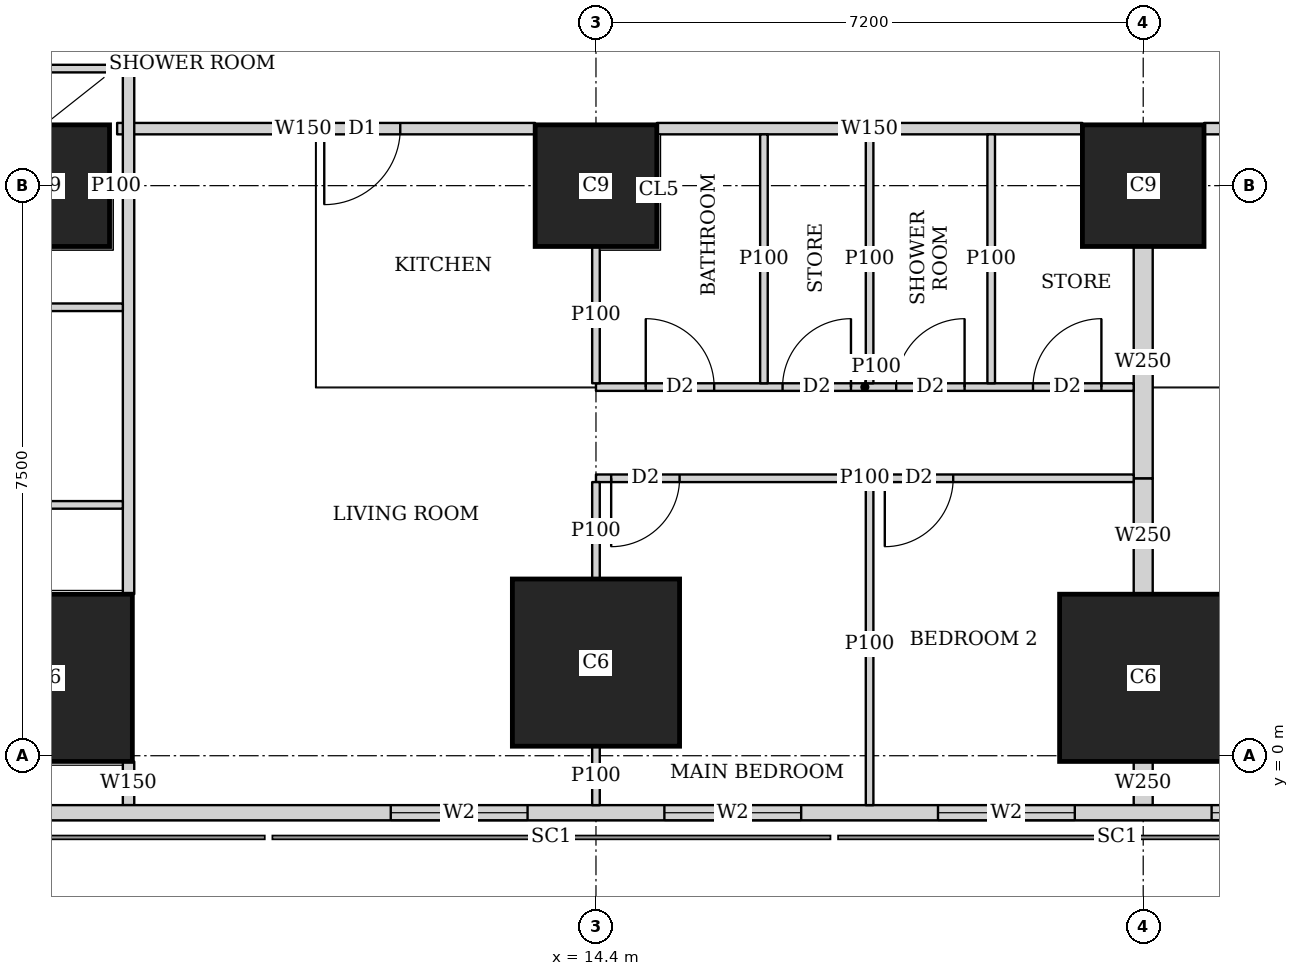
"""IFC4 building model, lengths in metres.
Left out: names, types, materials, properties, quantities, classifications, styles, units other than length and angle.
Written with IfcOpenShell. Run it as: python <this file> out.ifc"""

import sys

from ifc_helpers import new_model, si_unit, direction, frame, frame_2d, origin, origin_2d, place, context, subcontext, project, spatial, rectangle, extrude, element, fill, save


model = new_model("IFC4")
c1 = context("Model", 3, precision=1e-05, world=origin(), true_north=direction((0.0, 1.0)))
c2 = subcontext(c1, "Body", "Model", "MODEL_VIEW")
j1 = project(units=[si_unit("LENGTHUNIT", "METRE"), si_unit("PLANEANGLEUNIT", "RADIAN")], contexts=[c1])
p1 = place(None, origin())
s1 = spatial("IfcSite", under=j1, at=p1, CompositionType="ELEMENT")
p2 = place(p1, origin())
s2 = spatial("IfcBuilding", under=s1, at=p2, CompositionType="ELEMENT")
p3 = place(p2, frame((0.0, 0.0, 100.4)))
s3 = spatial("IfcBuildingStorey", under=s2, at=p3, CompositionType="ELEMENT", Elevation=100.4)
for number, where, z_axis, x_axis in (
    (1, (7.2, 1.025, 0.0), (0.0, 0.0, 1.0), (1.0, 0.0, 0.0)),
    (2, (14.4, 1.225, 0.0), (0.0, 0.0, 1.0), (1.0, 0.0, 0.0)),
    (3, (21.6, 1.025, 0.0), (0.0, 0.0, 1.0), (1.0, 0.0, 0.0)),
):
    element("IfcColumn", number, at=place(p3, frame(where, z_axis=z_axis, x_axis=x_axis)), inside=s3, PredefinedType="COLUMN", context=c2, shape_type="SweptSolid", body=[
        extrude(rectangle(XDim=2.2, YDim=2.2, at=origin_2d()), origin(), (0.0, 0.0, 1.0), 3.75),
    ])
for number, where, z_axis, x_axis in (
    (4, (7.2, 7.5, 0.0), (0.0, 0.0, 1.0), (1.0, 0.0, 0.0)),
    (5, (14.4, 7.5, 0.0), (0.0, 0.0, 1.0), (1.0, 0.0, 0.0)),
    (6, (21.6, 7.5, 0.0), (0.0, 0.0, 1.0), (1.0, 0.0, 0.0)),
):
    element("IfcColumn", number, at=place(p3, frame(where, z_axis=z_axis, x_axis=x_axis)), inside=s3, PredefinedType="COLUMN", context=c2, shape_type="SweptSolid", body=[
        extrude(rectangle(XDim=1.6, YDim=1.6, at=origin_2d()), origin(), (0.0, 0.0, 1.0), 3.75),
    ])
p4 = place(p3, frame((2.163, -0.75, 0.0), z_axis=(0.0, 0.0, 1.0), x_axis=(1.0, 0.0, 0.0)))
e7 = element("IfcWall", 7, at=p4, inside=s3, PredefinedType="SOLIDWALL", context=c2, shape_type="SweptSolid", body=[
    extrude(rectangle(XDim=45.628, YDim=0.2, at=frame_2d((22.814, 0.0))), origin(), (0.0, 0.0, 1.0), 3.5),
])
p5 = place(p4, frame((9.537, 0.0, 0.9)))
e8 = element("IfcOpeningElement", 8, at=p5, cuts=e7, PredefinedType="OPENING", context=c2, shape_type="SweptSolid", body=[
    extrude(rectangle(XDim=1.8, YDim=1.5, at=frame_2d((0.9, 0.75))), frame((0.0, 0.11, 0.0), z_axis=(0.0, -1.0, 0.0), x_axis=(1.0, 0.0, 0.0)), (0.0, 0.0, 1.0), 0.22),
])
p6 = place(p4, frame((13.137, 0.0, 0.9)))
e9 = element("IfcOpeningElement", 9, at=p6, cuts=e7, PredefinedType="OPENING", context=c2, shape_type="SweptSolid", body=[
    extrude(rectangle(XDim=1.8, YDim=1.5, at=frame_2d((0.9, 0.75))), frame((0.0, 0.11, 0.0), z_axis=(0.0, -1.0, 0.0), x_axis=(1.0, 0.0, 0.0)), (0.0, 0.0, 1.0), 0.22),
])
p7 = place(p4, frame((16.737, 0.0, 0.9)))
e10 = element("IfcOpeningElement", 10, at=p7, cuts=e7, PredefinedType="OPENING", context=c2, shape_type="SweptSolid", body=[
    extrude(rectangle(XDim=1.8, YDim=1.5, at=frame_2d((0.9, 0.75))), frame((0.0, 0.11, 0.0), z_axis=(0.0, -1.0, 0.0), x_axis=(1.0, 0.0, 0.0)), (0.0, 0.0, 1.0), 0.22),
])
p8 = place(p4, frame((20.337, 0.0, 0.9)))
e11 = element("IfcOpeningElement", 11, at=p8, cuts=e7, PredefinedType="OPENING", context=c2, shape_type="SweptSolid", body=[
    extrude(rectangle(XDim=1.8, YDim=1.5, at=frame_2d((0.9, 0.75))), frame((0.0, 0.11, 0.0), z_axis=(0.0, -1.0, 0.0), x_axis=(1.0, 0.0, 0.0)), (0.0, 0.0, 1.0), 0.22),
])
p9 = place(p4, frame((23.937, 0.0, 0.9)))
e12 = element("IfcOpeningElement", 12, at=p9, cuts=e7, PredefinedType="OPENING", context=c2, shape_type="SweptSolid", body=[
    extrude(rectangle(XDim=1.8, YDim=1.5, at=frame_2d((0.9, 0.75))), frame((0.0, 0.11, 0.0), z_axis=(0.0, -1.0, 0.0), x_axis=(1.0, 0.0, 0.0)), (0.0, 0.0, 1.0), 0.22),
])
p10 = place(p4, frame((27.537, 0.0, 0.9)))
e13 = element("IfcOpeningElement", 13, at=p10, cuts=e7, PredefinedType="OPENING", context=c2, shape_type="SweptSolid", body=[
    extrude(rectangle(XDim=1.8, YDim=1.5, at=frame_2d((0.9, 0.75))), frame((0.0, 0.11, 0.0), z_axis=(0.0, -1.0, 0.0), x_axis=(1.0, 0.0, 0.0)), (0.0, 0.0, 1.0), 0.22),
])
p11 = place(p4, frame((31.137, 0.0, 0.9)))
e14 = element("IfcOpeningElement", 14, at=p11, cuts=e7, PredefinedType="OPENING", context=c2, shape_type="SweptSolid", body=[
    extrude(rectangle(XDim=1.8, YDim=1.5, at=frame_2d((0.9, 0.75))), frame((0.0, 0.11, 0.0), z_axis=(0.0, -1.0, 0.0), x_axis=(1.0, 0.0, 0.0)), (0.0, 0.0, 1.0), 0.22),
])
p12 = place(p4, frame((34.737, 0.0, 0.9)))
e15 = element("IfcOpeningElement", 15, at=p12, cuts=e7, PredefinedType="OPENING", context=c2, shape_type="SweptSolid", body=[
    extrude(rectangle(XDim=1.8, YDim=1.5, at=frame_2d((0.9, 0.75))), frame((0.0, 0.11, 0.0), z_axis=(0.0, -1.0, 0.0), x_axis=(1.0, 0.0, 0.0)), (0.0, 0.0, 1.0), 0.22),
])
p13 = place(p3, frame((8.25, -0.65, 0.0), z_axis=(0.0, 0.0, 1.0), x_axis=(0.0, 1.0, 0.0)))
e16 = element("IfcWall", 16, at=p13, inside=s3, PredefinedType="SOLIDWALL", context=c2, shape_type="SweptSolid", body=[
    extrude(rectangle(XDim=0.574, YDim=0.15, at=frame_2d((0.287, 0.0))), origin(), (0.0, 0.0, 1.0), 3.5),
])
p14 = place(p3, frame((8.25, 2.126, 0.0), z_axis=(0.0, 0.0, 1.0), x_axis=(0.0, 1.0, 0.0)))
e17 = element("IfcWall", 17, at=p14, inside=s3, PredefinedType="SOLIDWALL", context=c2, shape_type="SweptSolid", body=[
    extrude(rectangle(XDim=40.773, YDim=0.15, at=frame_2d((20.386, 0.0))), origin(), (0.0, 0.0, 1.0), 3.5),
])
p15 = place(p14, frame((10.286, 0.0, 0.0)))
e18 = element("IfcOpeningElement", 18, at=p15, cuts=e17, PredefinedType="OPENING", context=c2, shape_type="SweptSolid", body=[
    extrude(rectangle(XDim=1.0, YDim=2.1, at=frame_2d((0.5, 1.05))), frame((0.0, 0.085, 0.0), z_axis=(0.0, -1.0, 0.0), x_axis=(1.0, 0.0, 0.0)), (0.0, 0.0, 1.0), 0.17),
])
p16 = place(p14, frame((14.461, 0.0, 0.0)))
e19 = element("IfcOpeningElement", 19, at=p16, cuts=e17, PredefinedType="OPENING", context=c2, shape_type="SweptSolid", body=[
    extrude(rectangle(XDim=1.0, YDim=2.1, at=frame_2d((0.5, 1.05))), frame((0.0, 0.085, 0.0), z_axis=(0.0, -1.0, 0.0), x_axis=(1.0, 0.0, 0.0)), (0.0, 0.0, 1.0), 0.17),
])
p17 = place(p14, frame((25.287, 0.0, 0.0)))
e20 = element("IfcOpeningElement", 20, at=p17, cuts=e17, PredefinedType="OPENING", context=c2, shape_type="SweptSolid", body=[
    extrude(rectangle(XDim=1.0, YDim=2.1, at=frame_2d((0.5, 1.05))), frame((0.0, 0.085, 0.0), z_axis=(0.0, -1.0, 0.0), x_axis=(1.0, 0.0, 0.0)), (0.0, 0.0, 1.0), 0.17),
])
p18 = place(p14, frame((32.787, 0.0, 0.0)))
e21 = element("IfcOpeningElement", 21, at=p18, cuts=e17, PredefinedType="OPENING", context=c2, shape_type="SweptSolid", body=[
    extrude(rectangle(XDim=1.0, YDim=2.1, at=frame_2d((0.5, 1.05))), frame((0.0, 0.085, 0.0), z_axis=(0.0, -1.0, 0.0), x_axis=(1.0, 0.0, 0.0)), (0.0, 0.0, 1.0), 0.17),
])
p19 = place(p3, frame((27.999, 8.25, 0.0), z_axis=(0.0, 0.0, 1.0), x_axis=(-1.0, 0.0, 0.0)))
e22 = element("IfcWall", 22, at=p19, inside=s3, PredefinedType="SOLIDWALL", context=c2, shape_type="SweptSolid", body=[
    extrude(rectangle(XDim=5.598, YDim=0.15, at=frame_2d((2.799, 0.0))), origin(), (0.0, 0.0, 1.0), 3.5),
])
p20 = place(p19, frame((3.899, 0.0, 0.0)))
e23 = element("IfcOpeningElement", 23, at=p20, cuts=e22, PredefinedType="OPENING", context=c2, shape_type="SweptSolid", body=[
    extrude(rectangle(XDim=1.0, YDim=2.1, at=frame_2d((0.5, 1.05))), frame((0.0, 0.085, 0.0), z_axis=(0.0, -1.0, 0.0), x_axis=(1.0, 0.0, 0.0)), (0.0, 0.0, 1.0), 0.17),
])
p21 = place(p3, frame((20.799, 8.25, 0.0), z_axis=(0.0, 0.0, 1.0), x_axis=(-1.0, 0.0, 0.0)))
e24 = element("IfcWall", 24, at=p21, inside=s3, PredefinedType="SOLIDWALL", context=c2, shape_type="SweptSolid", body=[
    extrude(rectangle(XDim=5.598, YDim=0.15, at=frame_2d((2.799, 0.0))), origin(), (0.0, 0.0, 1.0), 3.5),
])
p22 = place(p3, frame((13.599, 8.25, 0.0), z_axis=(0.0, 0.0, 1.0), x_axis=(-1.0, 0.0, 0.0)))
e25 = element("IfcWall", 25, at=p22, inside=s3, PredefinedType="SOLIDWALL", context=c2, shape_type="SweptSolid", body=[
    extrude(rectangle(XDim=5.499, YDim=0.15, at=frame_2d((2.75, 0.0))), origin(), (0.0, 0.0, 1.0), 3.5),
])
p23 = place(p22, frame((1.774, 0.0, 0.0)))
e26 = element("IfcOpeningElement", 26, at=p23, cuts=e25, PredefinedType="OPENING", context=c2, shape_type="SweptSolid", body=[
    extrude(rectangle(XDim=1.0, YDim=2.1, at=frame_2d((0.5, 1.05))), frame((0.0, 0.085, 0.0), z_axis=(0.0, -1.0, 0.0), x_axis=(1.0, 0.0, 0.0)), (0.0, 0.0, 1.0), 0.17),
])
p24 = place(p3, frame((8.001, 7.5, 0.0), z_axis=(0.0, 0.0, 1.0), x_axis=(1.0, 0.0, 0.0)))
e27 = element("IfcWall", 27, at=p24, inside=s3, PredefinedType="PARTITIONING", context=c2, shape_type="SweptSolid", body=[
    extrude(rectangle(XDim=0.174, YDim=0.1, at=frame_2d((0.087, 0.0))), origin(), (0.0, 0.0, 1.0), 3.5),
])
for number, where, z_axis, x_axis in (
    (28, (4.9, 9.04, 0.0), (0.0, 0.0, 1.0), (1.0, 0.0, 0.0)),
    (29, (4.9, 5.9, 0.0), (0.0, 0.0, 1.0), (1.0, 0.0, 0.0)),
):
    element("IfcWall", number, at=place(p3, frame(where, z_axis=z_axis, x_axis=x_axis)), inside=s3, PredefinedType="PARTITIONING", context=c2, shape_type="SweptSolid", body=[
        extrude(rectangle(XDim=3.275, YDim=0.1, at=frame_2d((1.638, 0.0))), origin(), (0.0, 0.0, 1.0), 3.5),
    ])
p25 = place(p3, frame((21.475, 3.65, 0.0), z_axis=(0.0, 0.0, 1.0), x_axis=(-1.0, 0.0, 0.0)))
e30 = element("IfcWall", 30, at=p25, inside=s3, PredefinedType="PARTITIONING", context=c2, shape_type="SweptSolid", body=[
    extrude(rectangle(XDim=7.075, YDim=0.1, at=frame_2d((3.538, 0.0))), origin(), (0.0, 0.0, 1.0), 3.5),
])
p26 = place(p25, frame((5.975, 0.0, 0.0)))
e31 = element("IfcOpeningElement", 31, at=p26, cuts=e30, PredefinedType="OPENING", context=c2, shape_type="SweptSolid", body=[
    extrude(rectangle(XDim=0.9, YDim=2.1, at=frame_2d((0.45, 1.05))), frame((0.0, 0.06, 0.0), z_axis=(0.0, -1.0, 0.0), x_axis=(1.0, 0.0, 0.0)), (0.0, 0.0, 1.0), 0.12),
])
p27 = place(p25, frame((2.375, 0.0, 0.0)))
e32 = element("IfcOpeningElement", 32, at=p27, cuts=e30, PredefinedType="OPENING", context=c2, shape_type="SweptSolid", body=[
    extrude(rectangle(XDim=0.9, YDim=2.1, at=frame_2d((0.45, 1.05))), frame((0.0, 0.06, 0.0), z_axis=(0.0, -1.0, 0.0), x_axis=(1.0, 0.0, 0.0)), (0.0, 0.0, 1.0), 0.12),
])
p28 = place(p3, frame((21.475, 4.85, 0.0), z_axis=(0.0, 0.0, 1.0), x_axis=(-1.0, 0.0, 0.0)))
e33 = element("IfcWall", 33, at=p28, inside=s3, PredefinedType="PARTITIONING", context=c2, shape_type="SweptSolid", body=[
    extrude(rectangle(XDim=7.075, YDim=0.1, at=frame_2d((3.538, 0.0))), origin(), (0.0, 0.0, 1.0), 3.5),
])
p29 = place(p28, frame((5.52, 0.0, 0.0)))
e34 = element("IfcOpeningElement", 34, at=p29, cuts=e33, PredefinedType="OPENING", context=c2, shape_type="SweptSolid", body=[
    extrude(rectangle(XDim=0.9, YDim=2.1, at=frame_2d((0.45, 1.05))), frame((0.0, 0.06, 0.0), z_axis=(0.0, -1.0, 0.0), x_axis=(1.0, 0.0, 0.0)), (0.0, 0.0, 1.0), 0.12),
])
p30 = place(p28, frame((2.225, 0.0, 0.0)))
e35 = element("IfcOpeningElement", 35, at=p30, cuts=e33, PredefinedType="OPENING", context=c2, shape_type="SweptSolid", body=[
    extrude(rectangle(XDim=0.9, YDim=2.1, at=frame_2d((0.45, 1.05))), frame((0.0, 0.06, 0.0), z_axis=(0.0, -1.0, 0.0), x_axis=(1.0, 0.0, 0.0)), (0.0, 0.0, 1.0), 0.12),
])
p31 = place(p28, frame((3.72, 0.0, 0.0)))
e36 = element("IfcOpeningElement", 36, at=p31, cuts=e33, PredefinedType="OPENING", context=c2, shape_type="SweptSolid", body=[
    extrude(rectangle(XDim=0.9, YDim=2.1, at=frame_2d((0.45, 1.05))), frame((0.0, 0.06, 0.0), z_axis=(0.0, -1.0, 0.0), x_axis=(1.0, 0.0, 0.0)), (0.0, 0.0, 1.0), 0.12),
])
p32 = place(p28, frame((0.425, 0.0, 0.0)))
e37 = element("IfcOpeningElement", 37, at=p32, cuts=e33, PredefinedType="OPENING", context=c2, shape_type="SweptSolid", body=[
    extrude(rectangle(XDim=0.9, YDim=2.1, at=frame_2d((0.45, 1.05))), frame((0.0, 0.06, 0.0), z_axis=(0.0, -1.0, 0.0), x_axis=(1.0, 0.0, 0.0)), (0.0, 0.0, 1.0), 0.12),
])
p33 = place(p3, frame((14.4, -0.65, 0.0), z_axis=(0.0, 0.0, 1.0), x_axis=(0.0, 1.0, 0.0)))
e38 = element("IfcWall", 38, at=p33, inside=s3, PredefinedType="PARTITIONING", context=c2, shape_type="SweptSolid", body=[
    extrude(rectangle(XDim=0.774, YDim=0.1, at=frame_2d((0.387, 0.0))), origin(), (0.0, 0.0, 1.0), 3.5),
])
p34 = place(p3, frame((14.4, 2.326, 0.0), z_axis=(0.0, 0.0, 1.0), x_axis=(0.0, 1.0, 0.0)))
e39 = element("IfcWall", 39, at=p34, inside=s3, PredefinedType="PARTITIONING", context=c2, shape_type="SweptSolid", body=[
    extrude(rectangle(XDim=1.274, YDim=0.1, at=frame_2d((0.637, 0.0))), origin(), (0.0, 0.0, 1.0), 3.5),
])
p35 = place(p3, frame((18.0, -0.65, 0.0), z_axis=(0.0, 0.0, 1.0), x_axis=(0.0, 1.0, 0.0)))
e40 = element("IfcWall", 40, at=p35, inside=s3, PredefinedType="PARTITIONING", context=c2, shape_type="SweptSolid", body=[
    extrude(rectangle(XDim=4.25, YDim=0.1, at=frame_2d((2.125, 0.0))), origin(), (0.0, 0.0, 1.0), 2.2),
])
p36 = place(p3, frame((14.4, 4.9, 0.0), z_axis=(0.0, 0.0, 1.0), x_axis=(0.0, 1.0, 0.0)))
e41 = element("IfcWall", 41, at=p36, inside=s3, PredefinedType="PARTITIONING", context=c2, shape_type="SweptSolid", body=[
    extrude(rectangle(XDim=1.799, YDim=0.1, at=frame_2d((0.899, 0.0))), origin(), (0.0, 0.0, 1.0), 3.5),
])
for number, where, z_axis, x_axis in (
    (42, (18.0, 4.9, 0.0), (0.0, 0.0, 1.0), (0.0, 1.0, 0.0)),
    (43, (16.61, 4.9, 0.0), (0.0, 0.0, 1.0), (0.0, 1.0, 0.0)),
    (44, (19.6, 4.9, 0.0), (0.0, 0.0, 1.0), (0.0, 1.0, 0.0)),
):
    element("IfcWall", number, at=place(p3, frame(where, z_axis=z_axis, x_axis=x_axis)), inside=s3, PredefinedType="PARTITIONING", context=c2, shape_type="SweptSolid", body=[
        extrude(rectangle(XDim=3.275, YDim=0.1, at=frame_2d((1.638, 0.0))), origin(), (0.0, 0.0, 1.0), 3.5),
    ])
p37 = place(p3, frame((21.6, -0.65, 0.0), z_axis=(0.0, 0.0, 1.0), x_axis=(0.0, 1.0, 0.0)))
e45 = element("IfcWall", 45, at=p37, inside=s3, PredefinedType="SOLIDWALL", context=c2, shape_type="SweptSolid", body=[
    extrude(rectangle(XDim=0.574, YDim=0.25, at=frame_2d((0.287, 0.0))), origin(), (0.0, 0.0, 1.0), 3.5),
])
p38 = place(p3, frame((21.6, 2.126, 0.0), z_axis=(0.0, 0.0, 1.0), x_axis=(0.0, 1.0, 0.0)))
e46 = element("IfcWall", 46, at=p38, inside=s3, PredefinedType="SOLIDWALL", context=c2, shape_type="SweptSolid", body=[
    extrude(rectangle(XDim=1.524, YDim=0.25, at=frame_2d((0.762, 0.0))), origin(), (0.0, 0.0, 1.0), 3.5),
])
p39 = place(p3, frame((21.6, 3.65, 0.0), z_axis=(0.0, 0.0, 1.0), x_axis=(0.0, 1.0, 0.0)))
e47 = element("IfcWall", 47, at=p39, inside=s3, PredefinedType="SOLIDWALL", context=c2, shape_type="SweptSolid", body=[
    extrude(rectangle(XDim=3.049, YDim=0.25, at=frame_2d((1.524, 0.0))), origin(), (0.0, 0.0, 1.0), 3.5),
])
p40 = place(p3, frame((8.175, 3.3, 0.0), z_axis=(0.0, 0.0, 1.0), x_axis=(-1.0, 0.0, 0.0)))
e48 = element("IfcWall", 48, at=p40, inside=s3, PredefinedType="PARTITIONING", context=c2, shape_type="SweptSolid", body=[
    extrude(rectangle(XDim=3.275, YDim=0.1, at=frame_2d((1.638, 0.0))), origin(), (0.0, 0.0, 1.0), 3.5),
])
p41 = place(p40, frame((2.1, 0.0, 0.0)))
e49 = element("IfcOpeningElement", 49, at=p41, cuts=e48, PredefinedType="OPENING", context=c2, shape_type="SweptSolid", body=[
    extrude(rectangle(XDim=0.9, YDim=2.1, at=frame_2d((0.45, 1.05))), frame((0.0, 0.06, 0.0), z_axis=(0.0, -1.0, 0.0), x_axis=(1.0, 0.0, 0.0)), (0.0, 0.0, 1.0), 0.12),
])
p42 = place(p5, origin())
e50 = element("IfcWindow", 50, at=p42, inside=s3, PartitioningType="SINGLE_PANEL", PredefinedType="WINDOW", context=c2, shape_type="SweptSolid", body=[
    extrude(rectangle(XDim=1.8, YDim=1.5, at=frame_2d((0.9, 0.75))), frame((0.0, 0.03, 0.0), z_axis=(0.0, -1.0, 0.0), x_axis=(1.0, 0.0, 0.0)), (0.0, 0.0, 1.0), 0.06),
])
fill(e8, e50)
p43 = place(p6, origin())
e51 = element("IfcWindow", 51, at=p43, inside=s3, PartitioningType="SINGLE_PANEL", PredefinedType="WINDOW", context=c2, shape_type="SweptSolid", body=[
    extrude(rectangle(XDim=1.8, YDim=1.5, at=frame_2d((0.9, 0.75))), frame((0.0, 0.03, 0.0), z_axis=(0.0, -1.0, 0.0), x_axis=(1.0, 0.0, 0.0)), (0.0, 0.0, 1.0), 0.06),
])
fill(e9, e51)
p44 = place(p7, origin())
e52 = element("IfcWindow", 52, at=p44, inside=s3, PartitioningType="SINGLE_PANEL", PredefinedType="WINDOW", context=c2, shape_type="SweptSolid", body=[
    extrude(rectangle(XDim=1.8, YDim=1.5, at=frame_2d((0.9, 0.75))), frame((0.0, 0.03, 0.0), z_axis=(0.0, -1.0, 0.0), x_axis=(1.0, 0.0, 0.0)), (0.0, 0.0, 1.0), 0.06),
])
fill(e10, e52)
p45 = place(p8, origin())
e53 = element("IfcWindow", 53, at=p45, inside=s3, PartitioningType="SINGLE_PANEL", PredefinedType="WINDOW", context=c2, shape_type="SweptSolid", body=[
    extrude(rectangle(XDim=1.8, YDim=1.5, at=frame_2d((0.9, 0.75))), frame((0.0, 0.03, 0.0), z_axis=(0.0, -1.0, 0.0), x_axis=(1.0, 0.0, 0.0)), (0.0, 0.0, 1.0), 0.06),
])
fill(e11, e53)
p46 = place(p26, origin())
e54 = element("IfcDoor", 54, at=p46, inside=s3, OperationType="SINGLE_SWING_RIGHT", PredefinedType="DOOR", context=c2, shape_type="SweptSolid", body=[
    extrude(rectangle(XDim=0.9, YDim=2.1, at=frame_2d((0.45, 1.05))), frame((0.0, 0.025, 0.0), z_axis=(0.0, -1.0, 0.0), x_axis=(1.0, 0.0, 0.0)), (0.0, 0.0, 1.0), 0.05),
])
fill(e31, e54)
p47 = place(p27, origin())
e55 = element("IfcDoor", 55, at=p47, inside=s3, OperationType="SINGLE_SWING_RIGHT", PredefinedType="DOOR", context=c2, shape_type="SweptSolid", body=[
    extrude(rectangle(XDim=0.9, YDim=2.1, at=frame_2d((0.45, 1.05))), frame((0.0, 0.025, 0.0), z_axis=(0.0, -1.0, 0.0), x_axis=(1.0, 0.0, 0.0)), (0.0, 0.0, 1.0), 0.05),
])
fill(e32, e55)
p48 = place(p29, origin())
e56 = element("IfcDoor", 56, at=p48, inside=s3, OperationType="SINGLE_SWING_LEFT", PredefinedType="DOOR", context=c2, shape_type="SweptSolid", body=[
    extrude(rectangle(XDim=0.9, YDim=2.1, at=frame_2d((0.45, 1.05))), frame((0.0, 0.025, 0.0), z_axis=(0.0, -1.0, 0.0), x_axis=(1.0, 0.0, 0.0)), (0.0, 0.0, 1.0), 0.05),
])
fill(e34, e56)
p49 = place(p30, origin())
e57 = element("IfcDoor", 57, at=p49, inside=s3, OperationType="SINGLE_SWING_RIGHT", PredefinedType="DOOR", context=c2, shape_type="SweptSolid", body=[
    extrude(rectangle(XDim=0.9, YDim=2.1, at=frame_2d((0.45, 1.05))), frame((0.0, 0.025, 0.0), z_axis=(0.0, -1.0, 0.0), x_axis=(1.0, 0.0, 0.0)), (0.0, 0.0, 1.0), 0.05),
])
fill(e35, e57)
p50 = place(p31, origin())
e58 = element("IfcDoor", 58, at=p50, inside=s3, OperationType="SINGLE_SWING_RIGHT", PredefinedType="DOOR", context=c2, shape_type="SweptSolid", body=[
    extrude(rectangle(XDim=0.9, YDim=2.1, at=frame_2d((0.45, 1.05))), frame((0.0, 0.025, 0.0), z_axis=(0.0, -1.0, 0.0), x_axis=(1.0, 0.0, 0.0)), (0.0, 0.0, 1.0), 0.05),
])
fill(e36, e58)
p51 = place(p32, origin())
e59 = element("IfcDoor", 59, at=p51, inside=s3, OperationType="SINGLE_SWING_RIGHT", PredefinedType="DOOR", context=c2, shape_type="SweptSolid", body=[
    extrude(rectangle(XDim=0.9, YDim=2.1, at=frame_2d((0.45, 1.05))), frame((0.0, 0.025, 0.0), z_axis=(0.0, -1.0, 0.0), x_axis=(1.0, 0.0, 0.0)), (0.0, 0.0, 1.0), 0.05),
])
fill(e37, e59)
p52 = place(p23, origin())
e60 = element("IfcDoor", 60, at=p52, inside=s3, OperationType="SINGLE_SWING_RIGHT", PredefinedType="DOOR", context=c2, shape_type="SweptSolid", body=[
    extrude(rectangle(XDim=1.0, YDim=2.1, at=frame_2d((0.5, 1.05))), frame((0.0, 0.025, 0.0), z_axis=(0.0, -1.0, 0.0), x_axis=(1.0, 0.0, 0.0)), (0.0, 0.0, 1.0), 0.05),
])
fill(e26, e60)
save(model, sys.argv[1])
